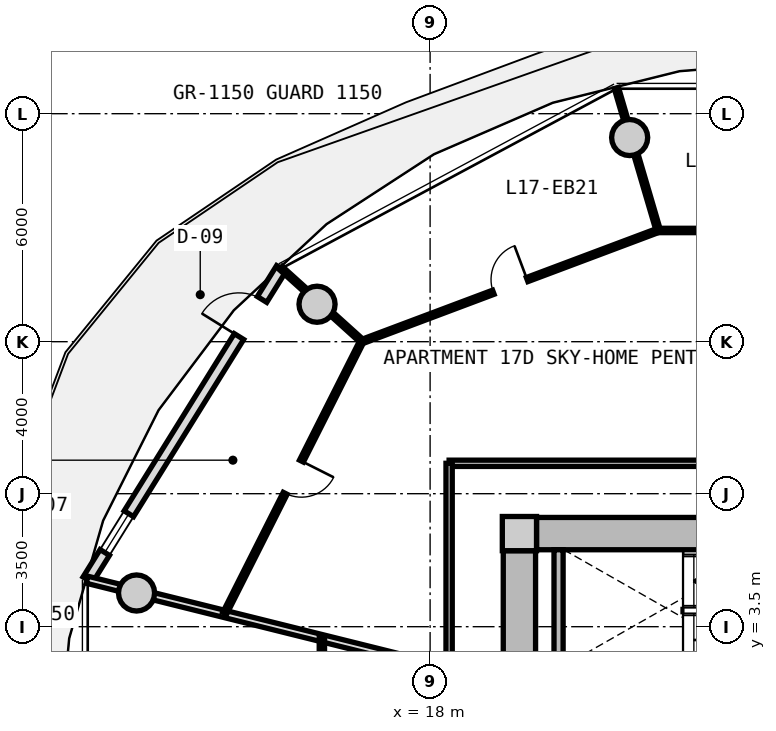
"""IFC4 building model, lengths in metres.
Left out: names, types, materials, properties, quantities, classifications, styles, units other than length and angle.
Written with IfcOpenShell. Run it as: python <this file> out.ifc"""

import sys

from ifc_helpers import new_model, si_unit, direction, frame, frame_2d, origin, origin_2d, place, context, subcontext, project, spatial, rectangle, circle, extrude, source, transform, mapped, element, fill, save


model = new_model("IFC4")
c1 = context("Model", 3, precision=1e-05, world=origin(), true_north=direction((0.0, 1.0)))
c2 = subcontext(c1, "Body", "Model", "MODEL_VIEW")
j1 = project(units=[si_unit("LENGTHUNIT", "METRE"), si_unit("PLANEANGLEUNIT", "RADIAN")], contexts=[c1])
p1 = place(None, origin())
s1 = spatial("IfcSite", under=j1, at=p1, CompositionType="ELEMENT")
p2 = place(p1, origin())
s2 = spatial("IfcBuilding", under=s1, at=p2, CompositionType="ELEMENT")
p3 = place(p2, frame((0.0, 0.0, 58.2)))
s3 = spatial("IfcBuildingStorey", under=s2, at=p3, CompositionType="ELEMENT", Elevation=58.2)
m1 = source(origin(), c2, "Body", "SweptSolid", [
    extrude(rectangle(XDim=0.9, YDim=0.9, at=origin_2d()), origin(), (0.0, 0.0, 1.0), 3.05),
])
p4 = place(p3, frame((20.35, 5.95, 0.0), z_axis=(0.0, 0.0, 1.0), x_axis=(1.0, 0.0, 0.0)))
e1 = element("IfcColumn", 1, at=p4, inside=s3, PredefinedType="COLUMN", context=c2, shape_type="MappedRepresentation", body=[
    mapped(m1, transform((0.0, 0.0, 0.0), x_axis=(1.0, 0.0, 0.0), y_axis=(0.0, 1.0, 0.0), z_axis=(0.0, 0.0, 1.0), scale=1.0)),
])
m2 = source(origin(), c2, "Body", "SweptSolid", [
    extrude(rectangle(XDim=14.4, YDim=0.85, at=frame_2d((7.2, 0.0))), origin(), (0.0, 0.0, 1.0), 2.79),
])
p5 = place(p3, frame((20.8, 5.95, 0.0), z_axis=(0.0, 0.0, 1.0), x_axis=(1.0, 0.0, 0.0)))
e2 = element("IfcWall", 2, at=p5, inside=s3, PredefinedType="SHEAR", context=c2, shape_type="MappedRepresentation", body=[
    mapped(m2, transform((0.0, 0.0, 0.0), x_axis=(1.0, 0.0, 0.0), y_axis=(0.0, 1.0, 0.0), z_axis=(0.0, 0.0, 1.0), scale=1.0)),
])
m3 = source(origin(), c2, "Body", "SweptSolid", [
    extrude(rectangle(XDim=11.0, YDim=0.85, at=frame_2d((5.5, 0.0))), origin(), (0.0, 0.0, 1.0), 2.79),
])
p6 = place(p3, frame((20.35, -5.5, 0.0), z_axis=(0.0, 0.0, 1.0), x_axis=(0.0, 1.0, 0.0)))
e3 = element("IfcWall", 3, at=p6, inside=s3, PredefinedType="SHEAR", context=c2, shape_type="MappedRepresentation", body=[
    mapped(m3, transform((0.0, 0.0, 0.0), x_axis=(1.0, 0.0, 0.0), y_axis=(0.0, 1.0, 0.0), z_axis=(0.0, 0.0, 1.0), scale=1.0)),
])
p7 = place(p6, frame((3.8, 0.0, 0.0)))
e4 = element("IfcOpeningElement", 4, at=p7, cuts=e3, PredefinedType="OPENING", context=c2, shape_type="SweptSolid", body=[
    extrude(rectangle(XDim=1.2, YDim=2.15, at=frame_2d((0.6, 1.075))), frame((0.0, 0.435, 0.0), z_axis=(0.0, -1.0, 0.0), x_axis=(1.0, 0.0, 0.0)), (0.0, 0.0, 1.0), 0.87),
])
m4 = source(origin(), c2, "Body", "SweptSolid", [
    extrude(circle(Radius=0.475, at=origin_2d()), origin(), (0.0, 0.0, 1.0), 3.05),
])
for number, where, z_axis, x_axis in (
    (5, (23.251, 16.373, 0.0), (0.0, 0.0, 1.0), (1.0, 0.0, 0.0)),
    (6, (15.025, 11.985, 0.0), (0.0, 0.0, 1.0), (1.0, 0.0, 0.0)),
    (7, (10.275, 4.387, 0.0), (0.0, 0.0, 1.0), (1.0, 0.0, 0.0)),
):
    element("IfcColumn", number, at=place(p3, frame(where, z_axis=z_axis, x_axis=x_axis)), inside=s3, PredefinedType="COLUMN", context=c2, shape_type="MappedRepresentation", body=[
        mapped(m4, transform((0.0, 0.0, 0.0), x_axis=(1.0, 0.0, 0.0), y_axis=(0.0, 1.0, 0.0), z_axis=(0.0, 0.0, 1.0), scale=1.0)),
    ])
m5 = source(origin(), c2, "Body", "SweptSolid", [
    extrude(rectangle(XDim=9.649, YDim=0.29, at=frame_2d((4.824, 0.0))), origin(), (0.0, 0.0, 1.0), 2.79),
])
p8 = place(p3, frame((8.99, 4.731, 0.0), z_axis=(0.0, 0.0, 1.0), x_axis=(0.527909458386, 0.849300655684, 0.0)))
e8 = element("IfcWall", 8, at=p8, inside=s3, PredefinedType="SOLIDWALL", context=c2, shape_type="MappedRepresentation", body=[
    mapped(m5, transform((0.0, 0.0, 0.0), x_axis=(1.0, 0.0, 0.0), y_axis=(0.0, 1.0, 0.0), z_axis=(0.0, 0.0, 1.0), scale=1.0)),
])
p9 = place(p8, frame((7.54, 0.0, 0.0)))
e9 = element("IfcOpeningElement", 9, at=p9, cuts=e8, PredefinedType="OPENING", context=c2, shape_type="SweptSolid", body=[
    extrude(rectangle(XDim=1.15, YDim=2.25, at=frame_2d((0.575, 1.125))), frame((0.0, 0.155, 0.0), z_axis=(0.0, -1.0, 0.0), x_axis=(1.0, 0.0, 0.0)), (0.0, 0.0, 1.0), 0.31),
])
p10 = place(p8, frame((0.85, 0.0, 0.85)))
e10 = element("IfcOpeningElement", 10, at=p10, cuts=e8, PredefinedType="OPENING", context=c2, shape_type="SweptSolid", body=[
    extrude(rectangle(XDim=1.2, YDim=1.5, at=frame_2d((0.6, 0.75))), frame((0.0, 0.155, 0.0), z_axis=(0.0, -1.0, 0.0), x_axis=(1.0, 0.0, 0.0)), (0.0, 0.0, 1.0), 0.31),
])
m6 = source(origin(), c2, "Body", "SweptSolid", [
    extrude(rectangle(XDim=3.075, YDim=0.24, at=frame_2d((1.538, 0.0))), origin(), (0.0, 0.0, 1.0), 2.79),
])
p11 = place(p3, frame((21.38, 2.45, 0.0), z_axis=(0.0, 0.0, 1.0), x_axis=(0.0, 1.0, 0.0)))
e11 = element("IfcWall", 11, at=p11, inside=s3, PredefinedType="PARTITIONING", context=c2, shape_type="MappedRepresentation", body=[
    mapped(m6, transform((0.0, 0.0, 0.0), x_axis=(1.0, 0.0, 0.0), y_axis=(0.0, 1.0, 0.0), z_axis=(0.0, 0.0, 1.0), scale=1.0)),
])
m7 = source(origin(), c2, "Body", "SweptSolid", [
    extrude(rectangle(XDim=19.0, YDim=0.165, at=frame_2d((9.5, 0.0))), origin(), (0.0, 0.0, 1.0), 2.775),
])
p12 = place(p3, frame((18.5, 7.8, 0.0), z_axis=(0.0, 0.0, 1.0), x_axis=(1.0, 0.0, 0.0)))
e12 = element("IfcWall", 12, at=p12, inside=s3, PredefinedType="PARTITIONING", context=c2, shape_type="MappedRepresentation", body=[
    mapped(m7, transform((0.0, 0.0, 0.0), x_axis=(1.0, 0.0, 0.0), y_axis=(0.0, 1.0, 0.0), z_axis=(0.0, 0.0, 1.0), scale=1.0)),
])
p13 = place(p12, frame((6.961, 0.0, 0.0)))
e13 = element("IfcOpeningElement", 13, at=p13, cuts=e12, PredefinedType="OPENING", context=c2, shape_type="SweptSolid", body=[
    extrude(rectangle(XDim=1.05, YDim=2.15, at=frame_2d((0.525, 1.075))), frame((0.0, 0.093, 0.0), z_axis=(0.0, -1.0, 0.0), x_axis=(1.0, 0.0, 0.0)), (0.0, 0.0, 1.0), 0.185),
])
m8 = source(origin(), c2, "Body", "SweptSolid", [
    extrude(rectangle(XDim=15.6, YDim=0.165, at=frame_2d((7.8, 0.0))), origin(), (0.0, 0.0, 1.0), 2.775),
])
p14 = place(p3, frame((18.5, -7.8, 0.0), z_axis=(0.0, 0.0, 1.0), x_axis=(0.0, 1.0, 0.0)))
e14 = element("IfcWall", 14, at=p14, inside=s3, PredefinedType="PARTITIONING", context=c2, shape_type="MappedRepresentation", body=[
    mapped(m8, transform((0.0, 0.0, 0.0), x_axis=(1.0, 0.0, 0.0), y_axis=(0.0, 1.0, 0.0), z_axis=(0.0, 0.0, 1.0), scale=1.0)),
])
p15 = place(p14, frame((3.63, 0.0, 0.0)))
e15 = element("IfcOpeningElement", 15, at=p15, cuts=e14, PredefinedType="OPENING", context=c2, shape_type="SweptSolid", body=[
    extrude(rectangle(XDim=1.05, YDim=2.15, at=frame_2d((0.525, 1.075))), frame((0.0, 0.093, 0.0), z_axis=(0.0, -1.0, 0.0), x_axis=(1.0, 0.0, 0.0)), (0.0, 0.0, 1.0), 0.185),
])
m9 = source(origin(), c2, "Body", "SweptSolid", [
    extrude(rectangle(XDim=9.737, YDim=0.19, at=frame_2d((4.869, 0.0))), origin(), (0.0, 0.0, 1.0), 2.225),
])
p16 = place(p3, frame((18.42, 2.385, 0.0), z_axis=(0.0, 0.0, 1.0), x_axis=(-0.970392716238, 0.241532557375, 0.0)))
e16 = element("IfcWall", 16, at=p16, inside=s3, PredefinedType="PARTITIONING", context=c2, shape_type="MappedRepresentation", body=[
    mapped(m9, transform((0.0, 0.0, 0.0), x_axis=(1.0, 0.0, 0.0), y_axis=(0.0, 1.0, 0.0), z_axis=(0.0, 0.0, 1.0), scale=1.0)),
])
m10 = source(origin(), c2, "Body", "SweptSolid", [
    extrude(rectangle(XDim=2.795, YDim=0.14, at=frame_2d((1.397, 0.0))), origin(), (0.0, 0.0, 1.0), 2.775),
])
p17 = place(p3, frame((15.148, 0.419, 0.0), z_axis=(0.0, 0.0, 1.0), x_axis=(0.001659531299, 0.999998622977, 0.0)))
e17 = element("IfcWall", 17, at=p17, inside=s3, PredefinedType="PARTITIONING", context=c2, shape_type="MappedRepresentation", body=[
    mapped(m10, transform((0.0, 0.0, 0.0), x_axis=(1.0, 0.0, 0.0), y_axis=(0.0, 1.0, 0.0), z_axis=(0.0, 0.0, 1.0), scale=1.0)),
])
m11 = source(origin(), c2, "Body", "SweptSolid", [
    extrude(rectangle(XDim=7.993, YDim=0.115, at=frame_2d((3.996, 0.0))), origin(), (0.0, 0.0, 1.0), 2.775),
])
p18 = place(p3, frame((31.996, 13.927, 0.0), z_axis=(0.0, 0.0, 1.0), x_axis=(-1.0, 0.0, 0.0)))
e18 = element("IfcWall", 18, at=p18, inside=s3, PredefinedType="PARTITIONING", context=c2, shape_type="MappedRepresentation", body=[
    mapped(m11, transform((0.0, 0.0, 0.0), x_axis=(1.0, 0.0, 0.0), y_axis=(0.0, 1.0, 0.0), z_axis=(0.0, 0.0, 1.0), scale=1.0)),
])
p19 = place(p18, frame((3.521, 0.0, 0.0)))
e19 = element("IfcOpeningElement", 19, at=p19, cuts=e18, PredefinedType="OPENING", context=c2, shape_type="SweptSolid", body=[
    extrude(rectangle(XDim=0.95, YDim=2.1, at=frame_2d((0.475, 1.05))), frame((0.0, 0.067, 0.0), z_axis=(0.0, -1.0, 0.0), x_axis=(1.0, 0.0, 0.0)), (0.0, 0.0, 1.0), 0.135),
])
m12 = source(origin(), c2, "Body", "SweptSolid", [
    extrude(rectangle(XDim=8.32, YDim=0.115, at=frame_2d((4.16, 0.0))), origin(), (0.0, 0.0, 1.0), 2.775),
])
p20 = place(p3, frame((24.003, 13.93, 0.0), z_axis=(0.0, 0.0, 1.0), x_axis=(-0.936180763098, -0.351518959382, 0.0)))
e20 = element("IfcWall", 20, at=p20, inside=s3, PredefinedType="PARTITIONING", context=c2, shape_type="MappedRepresentation", body=[
    mapped(m12, transform((0.0, 0.0, 0.0), x_axis=(1.0, 0.0, 0.0), y_axis=(0.0, 1.0, 0.0), z_axis=(0.0, 0.0, 1.0), scale=1.0)),
])
p21 = place(p20, frame((3.685, 0.0, 0.0)))
e21 = element("IfcOpeningElement", 21, at=p21, cuts=e20, PredefinedType="OPENING", context=c2, shape_type="SweptSolid", body=[
    extrude(rectangle(XDim=0.95, YDim=2.1, at=frame_2d((0.475, 1.05))), frame((0.0, 0.067, 0.0), z_axis=(0.0, -1.0, 0.0), x_axis=(1.0, 0.0, 0.0)), (0.0, 0.0, 1.0), 0.135),
])
m13 = source(origin(), c2, "Body", "SweptSolid", [
    extrude(rectangle(XDim=3.905, YDim=0.115, at=frame_2d((1.952, 0.0))), origin(), (0.0, 0.0, 1.0), 2.225),
])
p22 = place(p3, frame((24.003, 13.93, 0.0), z_axis=(0.0, 0.0, 1.0), x_axis=(-0.282037692958, 0.959403324859, 0.0)))
e22 = element("IfcWall", 22, at=p22, inside=s3, PredefinedType="PARTITIONING", context=c2, shape_type="MappedRepresentation", body=[
    mapped(m13, transform((0.0, 0.0, 0.0), x_axis=(1.0, 0.0, 0.0), y_axis=(0.0, 1.0, 0.0), z_axis=(0.0, 0.0, 1.0), scale=1.0)),
])
m14 = source(origin(), c2, "Body", "SweptSolid", [
    extrude(rectangle(XDim=8.018, YDim=0.115, at=frame_2d((4.009, 0.0))), origin(), (0.0, 0.0, 1.0), 2.775),
])
p23 = place(p3, frame((16.205, 11.014, 0.0), z_axis=(0.0, 0.0, 1.0), x_axis=(-0.450134355233, -0.89296084026, 0.0)))
e23 = element("IfcWall", 23, at=p23, inside=s3, PredefinedType="PARTITIONING", context=c2, shape_type="MappedRepresentation", body=[
    mapped(m14, transform((0.0, 0.0, 0.0), x_axis=(1.0, 0.0, 0.0), y_axis=(0.0, 1.0, 0.0), z_axis=(0.0, 0.0, 1.0), scale=1.0)),
])
p24 = place(p23, frame((3.534, 0.0, 0.0)))
e24 = element("IfcOpeningElement", 24, at=p24, cuts=e23, PredefinedType="OPENING", context=c2, shape_type="SweptSolid", body=[
    extrude(rectangle(XDim=0.95, YDim=2.1, at=frame_2d((0.475, 1.05))), frame((0.0, 0.067, 0.0), z_axis=(0.0, -1.0, 0.0), x_axis=(1.0, 0.0, 0.0)), (0.0, 0.0, 1.0), 0.135),
])
m15 = source(origin(), c2, "Body", "SweptSolid", [
    extrude(rectangle(XDim=2.875, YDim=0.115, at=frame_2d((1.438, 0.0))), origin(), (0.0, 0.0, 1.0), 2.225),
])
p25 = place(p3, frame((16.205, 11.014, 0.0), z_axis=(0.0, 0.0, 1.0), x_axis=(-0.742512588127, 0.669832110661, 0.0)))
e25 = element("IfcWall", 25, at=p25, inside=s3, PredefinedType="PARTITIONING", context=c2, shape_type="MappedRepresentation", body=[
    mapped(m15, transform((0.0, 0.0, 0.0), x_axis=(1.0, 0.0, 0.0), y_axis=(0.0, 1.0, 0.0), z_axis=(0.0, 0.0, 1.0), scale=1.0)),
])
m16 = source(origin(), c2, "Body", "SweptSolid", [
    extrude(rectangle(XDim=1.15, YDim=2.25, at=frame_2d((0.575, 1.125))), frame((0.0, 0.025, 0.0), z_axis=(0.0, -1.0, 0.0), x_axis=(1.0, 0.0, 0.0)), (0.0, 0.0, 1.0), 0.05),
])
p26 = place(p9, origin())
e26 = element("IfcDoor", 26, at=p26, inside=s3, OperationType="SINGLE_SWING_LEFT", PredefinedType="DOOR", context=c2, shape_type="MappedRepresentation", body=[
    mapped(m16, transform((0.0, 0.0, 0.0), x_axis=(1.0, 0.0, 0.0), y_axis=(0.0, 1.0, 0.0), z_axis=(0.0, 0.0, 1.0), scale=1.0)),
])
fill(e9, e26)
m17 = source(origin(), c2, "Body", "SweptSolid", [
    extrude(rectangle(XDim=1.2, YDim=1.5, at=frame_2d((0.6, 0.75))), frame((0.0, 0.03, 0.0), z_axis=(0.0, -1.0, 0.0), x_axis=(1.0, 0.0, 0.0)), (0.0, 0.0, 1.0), 0.06),
])
p27 = place(p10, origin())
e27 = element("IfcWindow", 27, at=p27, inside=s3, PartitioningType="SINGLE_PANEL", PredefinedType="WINDOW", context=c2, shape_type="MappedRepresentation", body=[
    mapped(m17, transform((0.0, 0.0, 0.0), x_axis=(1.0, 0.0, 0.0), y_axis=(0.0, 1.0, 0.0), z_axis=(0.0, 0.0, 1.0), scale=1.0)),
])
fill(e10, e27)
m18 = source(origin(), c2, "Body", "SweptSolid", [
    extrude(rectangle(XDim=0.95, YDim=2.1, at=frame_2d((0.475, 1.05))), frame((0.0, 0.025, 0.0), z_axis=(0.0, -1.0, 0.0), x_axis=(1.0, 0.0, 0.0)), (0.0, 0.0, 1.0), 0.05),
])
p28 = place(p21, frame((0.95, 0.0, 0.0), z_axis=(0.0, 0.0, 1.0), x_axis=(-1.0, 0.0, 0.0)))
e28 = element("IfcDoor", 28, at=p28, inside=s3, OperationType="SINGLE_SWING_RIGHT", PredefinedType="DOOR", context=c2, shape_type="MappedRepresentation", body=[
    mapped(m18, transform((0.0, 0.0, 0.0), x_axis=(1.0, 0.0, 0.0), y_axis=(0.0, 1.0, 0.0), z_axis=(0.0, 0.0, 1.0), scale=1.0)),
])
fill(e21, e28)
p29 = place(p24, origin())
e29 = element("IfcDoor", 29, at=p29, inside=s3, OperationType="SINGLE_SWING_LEFT", PredefinedType="DOOR", context=c2, shape_type="MappedRepresentation", body=[
    mapped(m18, transform((0.0, 0.0, 0.0), x_axis=(1.0, 0.0, 0.0), y_axis=(0.0, 1.0, 0.0), z_axis=(0.0, 0.0, 1.0), scale=1.0)),
])
fill(e24, e29)
save(model, sys.argv[1])
